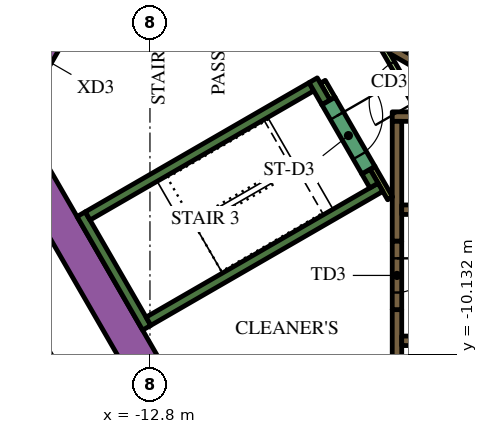
"""IFC4 building model, lengths in metres.
Left out: names, types, materials, properties, quantities, classifications, styles, units other than length and angle.
Written with IfcOpenShell. Run it as: python <this file> out.ifc"""

import sys

from ifc_helpers import new_model, si_unit, direction, frame, frame_2d, origin, place, context, subcontext, project, spatial, polyline, rectangle, outline, extrude, element, fill, save


model = new_model("IFC4")
c1 = context("Model", 3, precision=1e-05, world=origin(), true_north=direction((0.0, 1.0)))
c2 = subcontext(c1, "Body", "Model", "MODEL_VIEW")
j1 = project(units=[si_unit("LENGTHUNIT", "METRE"), si_unit("PLANEANGLEUNIT", "RADIAN")], contexts=[c1])
p1 = place(None, origin())
s1 = spatial("IfcSite", under=j1, at=p1, CompositionType="ELEMENT")
p2 = place(p1, origin())
s2 = spatial("IfcBuilding", under=s1, at=p2, CompositionType="ELEMENT")
p3 = place(p2, frame((0.0, 0.0, 27.6)))
s3 = spatial("IfcBuildingStorey", under=s2, at=p3, CompositionType="ELEMENT", Elevation=27.6)
p4 = place(p3, frame((-12.134, -11.883, 0.0), z_axis=(0.0, 0.0, 1.0), x_axis=(-0.500005339912, 0.866022320763, 0.0)))
e1 = element("IfcWall", 1, at=p4, inside=s3, PredefinedType="SOLIDWALL", context=c2, shape_type="SweptSolid", body=[
    extrude(rectangle(XDim=9.488, YDim=0.9, at=frame_2d((4.744, 0.0))), origin(), (0.0, 0.0, 1.0), 3.9),
])
p5 = place(p3, frame((-12.885, -9.431, 0.0), z_axis=(0.0, 0.0, 1.0), x_axis=(-0.500020560727, 0.866013532718, 0.0)))
e2 = element("IfcWall", 2, at=p5, inside=s3, PredefinedType="SOLIDWALL", context=c2, shape_type="SweptSolid", body=[
    extrude(rectangle(XDim=3.45, YDim=0.25, at=frame_2d((1.725, 0.0))), origin(), (0.0, 0.0, 1.0), 3.9),
])
p6 = place(p3, frame((-14.44, -6.49, 0.0), z_axis=(0.0, 0.0, 1.0), x_axis=(0.866022966069, 0.500004222222, 0.0)))
e3 = element("IfcWall", 3, at=p6, inside=s3, PredefinedType="SOLIDWALL", context=c2, shape_type="SweptSolid", body=[
    extrude(rectangle(XDim=6.8, YDim=0.25, at=frame_2d((3.4, 0.0))), origin(), (0.0, 0.0, 1.0), 3.9),
])
p7 = place(p3, frame((-8.168, -3.503, 0.0), z_axis=(0.0, 0.0, 1.0), x_axis=(-0.499952099219, 0.866053057547, 0.0)))
e4 = element("IfcWall", 4, at=p7, inside=s3, PredefinedType="SOLIDWALL", context=c2, shape_type="SweptSolid", body=[
    extrude(rectangle(XDim=0.675, YDim=0.25, at=frame_2d((0.337, 0.0))), origin(), (0.0, 0.0, 1.0), 3.9),
])
p8 = place(p3, frame((-12.84, -9.261, 0.0), z_axis=(0.0, 0.0, 1.0), x_axis=(0.866016039709, 0.500016218704, 0.0)))
e5 = element("IfcWall", 5, at=p8, inside=s3, PredefinedType="SOLIDWALL", context=c2, shape_type="SweptSolid", body=[
    extrude(rectangle(XDim=7.05, YDim=0.25, at=frame_2d((3.525, 0.0))), origin(), (0.0, 0.0, 1.0), 3.9),
])
p9 = place(p3, frame((-6.905, -5.69, 0.0), z_axis=(0.0, 0.0, 1.0), x_axis=(-0.500402024738, 0.865793170242, 0.0)))
e6 = element("IfcWall", 6, at=p9, inside=s3, PredefinedType="SOLIDWALL", context=c2, shape_type="SweptSolid", body=[
    extrude(rectangle(XDim=0.425, YDim=0.25, at=frame_2d((0.212, 0.0))), origin(), (0.0, 0.0, 1.0), 3.9),
])
p10 = place(p3, frame((-6.3, -12.1, 0.0), z_axis=(0.0, 0.0, 1.0), x_axis=(0.0, 1.0, 0.0)))
e7 = element("IfcWall", 7, at=p10, inside=s3, PredefinedType="SOLIDWALL", context=c2, shape_type="SweptSolid", body=[
    extrude(rectangle(XDim=3.146, YDim=0.25, at=frame_2d((1.573, 0.0))), origin(), (0.0, 0.0, 1.0), 3.9),
])
p11 = place(p3, frame((-6.425, -3.875, 0.0), z_axis=(0.0, 0.0, 1.0), x_axis=(1.0, 0.0, 0.0)))
e8 = element("IfcWall", 8, at=p11, inside=s3, PredefinedType="SOLIDWALL", context=c2, shape_type="SweptSolid", body=[
    extrude(rectangle(XDim=0.658, YDim=0.25, at=frame_2d((0.329, 0.0))), origin(), (0.0, 0.0, 1.0), 3.9),
])
p12 = place(p3, frame((-6.3, -4.0, 0.0), z_axis=(0.0, 0.0, 1.0), x_axis=(0.0, -1.0, 0.0)))
e9 = element("IfcWall", 9, at=p12, inside=s3, PredefinedType="SOLIDWALL", context=c2, shape_type="SweptSolid", body=[
    extrude(rectangle(XDim=3.154, YDim=0.25, at=frame_2d((1.577, 0.0))), origin(), (0.0, 0.0, 1.0), 3.9),
])
p13 = place(p3, origin())
e10 = element("IfcWall", 10, at=p13, inside=s3, PredefinedType="SOLIDWALL", context=c2, shape_type="SweptSolid", body=[
    extrude(outline(polyline([(-5.922, -2.257), (-5.922, -2.257), (-5.705, -2.382), (-5.83, -2.598), (-6.483, -2.221), (-6.591, -2.033), (-6.591, -2.033), (-6.7, -2.096), (-7.952, -1.373), (-7.827, -1.156), (-5.922, -2.257)])), origin(), (0.0, 0.0, 1.0), 3.9),
])
p14 = place(p3, frame((-6.48, -6.027, 0.0), z_axis=(0.0, 0.0, 1.0), x_axis=(-0.499927229454, 0.866067413802, 0.0)))
e11 = element("IfcWall", 11, at=p14, inside=s3, PredefinedType="PARTITIONING", context=c2, shape_type="SweptSolid", body=[
    extrude(rectangle(XDim=0.929, YDim=0.15, at=frame_2d((0.464, 0.0))), origin(), (0.0, 0.0, 1.0), 3.9),
])
p15 = place(p3, frame((-8.252, -2.958, 0.0), z_axis=(0.0, 0.0, 1.0), x_axis=(0.500174715838, -0.865924508047, 0.0)))
e12 = element("IfcWall", 12, at=p15, inside=s3, PredefinedType="PARTITIONING", context=c2, shape_type="SweptSolid", body=[
    extrude(rectangle(XDim=0.514, YDim=0.15, at=frame_2d((0.257, 0.0))), origin(), (0.0, 0.0, 1.0), 2.75),
])
p16 = place(p3, frame((-6.175, -9.775, 0.0), z_axis=(0.0, 0.0, 1.0), x_axis=(1.0, 0.0, 0.0)))
e13 = element("IfcWall", 13, at=p16, inside=s3, PredefinedType="SOLIDWALL", context=c2, shape_type="SweptSolid", body=[
    extrude(rectangle(XDim=12.35, YDim=0.25, at=frame_2d((6.175, 0.0))), origin(), (0.0, 0.0, 1.0), 3.9),
])
p17 = place(p16, frame((0.585, 0.0, 0.0)))
e14 = element("IfcOpeningElement", 14, at=p17, cuts=e13, PredefinedType="OPENING", context=c2, shape_type="SweptSolid", body=[
    extrude(rectangle(XDim=1.1, YDim=2.1, at=frame_2d((0.55, 1.05))), frame((0.0, 0.135, 0.0), z_axis=(0.0, -1.0, 0.0), x_axis=(1.0, 0.0, 0.0)), (0.0, 0.0, 1.0), 0.27),
])
p18 = place(p16, frame((3.105, 0.0, 0.0)))
e15 = element("IfcOpeningElement", 15, at=p18, cuts=e13, PredefinedType="OPENING", context=c2, shape_type="SweptSolid", body=[
    extrude(rectangle(XDim=1.1, YDim=2.1, at=frame_2d((0.55, 1.05))), frame((0.0, 0.135, 0.0), z_axis=(0.0, -1.0, 0.0), x_axis=(1.0, 0.0, 0.0)), (0.0, 0.0, 1.0), 0.27),
])
p19 = place(p16, frame((5.625, 0.0, 0.0)))
e16 = element("IfcOpeningElement", 16, at=p19, cuts=e13, PredefinedType="OPENING", context=c2, shape_type="SweptSolid", body=[
    extrude(rectangle(XDim=1.1, YDim=2.1, at=frame_2d((0.55, 1.05))), frame((0.0, 0.135, 0.0), z_axis=(0.0, -1.0, 0.0), x_axis=(1.0, 0.0, 0.0)), (0.0, 0.0, 1.0), 0.27),
])
p20 = place(p16, frame((8.145, 0.0, 0.0)))
e17 = element("IfcOpeningElement", 17, at=p20, cuts=e13, PredefinedType="OPENING", context=c2, shape_type="SweptSolid", body=[
    extrude(rectangle(XDim=1.1, YDim=2.1, at=frame_2d((0.55, 1.05))), frame((0.0, 0.135, 0.0), z_axis=(0.0, -1.0, 0.0), x_axis=(1.0, 0.0, 0.0)), (0.0, 0.0, 1.0), 0.27),
])
p21 = place(p16, frame((10.665, 0.0, 0.0)))
e18 = element("IfcOpeningElement", 18, at=p21, cuts=e13, PredefinedType="OPENING", context=c2, shape_type="SweptSolid", body=[
    extrude(rectangle(XDim=1.1, YDim=2.1, at=frame_2d((0.55, 1.05))), frame((0.0, 0.135, 0.0), z_axis=(0.0, -1.0, 0.0), x_axis=(1.0, 0.0, 0.0)), (0.0, 0.0, 1.0), 0.27),
])
p22 = place(p3, frame((-6.175, -6.325, 0.0), z_axis=(0.0, 0.0, 1.0), x_axis=(1.0, 0.0, 0.0)))
e19 = element("IfcWall", 19, at=p22, inside=s3, PredefinedType="SOLIDWALL", context=c2, shape_type="SweptSolid", body=[
    extrude(rectangle(XDim=12.35, YDim=0.25, at=frame_2d((6.175, 0.0))), origin(), (0.0, 0.0, 1.0), 3.9),
])
p23 = place(p22, frame((3.205, 0.0, 0.0)))
e20 = element("IfcOpeningElement", 20, at=p23, cuts=e19, PredefinedType="OPENING", context=c2, shape_type="SweptSolid", body=[
    extrude(rectangle(XDim=0.9, YDim=2.1, at=frame_2d((0.45, 1.05))), frame((0.0, 0.135, 0.0), z_axis=(0.0, -1.0, 0.0), x_axis=(1.0, 0.0, 0.0)), (0.0, 0.0, 1.0), 0.27),
])
p24 = place(p22, frame((8.145, 0.0, 0.0)))
e21 = element("IfcOpeningElement", 21, at=p24, cuts=e19, PredefinedType="OPENING", context=c2, shape_type="SweptSolid", body=[
    extrude(rectangle(XDim=1.1, YDim=2.1, at=frame_2d((0.55, 1.05))), frame((0.0, 0.135, 0.0), z_axis=(0.0, -1.0, 0.0), x_axis=(1.0, 0.0, 0.0)), (0.0, 0.0, 1.0), 0.27),
])
p25 = place(p22, frame((10.665, 0.0, 0.0)))
e22 = element("IfcOpeningElement", 22, at=p25, cuts=e19, PredefinedType="OPENING", context=c2, shape_type="SweptSolid", body=[
    extrude(rectangle(XDim=1.1, YDim=2.1, at=frame_2d((0.55, 1.05))), frame((0.0, 0.135, 0.0), z_axis=(0.0, -1.0, 0.0), x_axis=(1.0, 0.0, 0.0)), (0.0, 0.0, 1.0), 0.27),
])
p26 = place(p3, frame((-8.103, -3.466, 0.0), z_axis=(0.0, 0.0, 1.0), x_axis=(0.500078061341, -0.865980330357, 0.0)))
e23 = element("IfcWall", 23, at=p26, inside=s3, PredefinedType="SOLIDWALL", context=c2, shape_type="SweptSolid", body=[
    extrude(rectangle(XDim=2.1, YDim=0.4, at=frame_2d((1.05, 0.0))), origin(), (0.0, 0.0, 1.0), 3.9),
])
p27 = place(p26, frame((0.45, 0.0, 0.0)))
e24 = element("IfcOpeningElement", 24, at=p27, cuts=e23, PredefinedType="OPENING", context=c2, shape_type="SweptSolid", body=[
    extrude(rectangle(XDim=1.2, YDim=2.1, at=frame_2d((0.6, 1.05))), frame((0.0, 0.21, 0.0), z_axis=(0.0, -1.0, 0.0), x_axis=(1.0, 0.0, 0.0)), (0.0, 0.0, 1.0), 0.42),
])
p28 = place(p3, frame((-6.3, -7.154, 0.0), z_axis=(0.0, 0.0, 1.0), x_axis=(0.0, -1.0, 0.0)))
e25 = element("IfcWall", 25, at=p28, inside=s3, PredefinedType="SOLIDWALL", context=c2, shape_type="SweptSolid", body=[
    extrude(rectangle(XDim=1.8, YDim=0.25, at=frame_2d((0.9, 0.0))), origin(), (0.0, 0.0, 1.0), 3.9),
])
p29 = place(p28, frame((0.45, 0.0, 0.0)))
e26 = element("IfcOpeningElement", 26, at=p29, cuts=e25, PredefinedType="OPENING", context=c2, shape_type="SweptSolid", body=[
    extrude(rectangle(XDim=0.9, YDim=2.1, at=frame_2d((0.45, 1.05))), frame((0.0, 0.135, 0.0), z_axis=(0.0, -1.0, 0.0), x_axis=(1.0, 0.0, 0.0)), (0.0, 0.0, 1.0), 0.27),
])
p30 = place(p3, frame((-5.606, -3.89, 0.0), z_axis=(0.0, 0.0, 1.0), x_axis=(-0.500027713859, 0.866009402589, 0.0)))
e27 = element("IfcWall", 27, at=p30, inside=s3, PredefinedType="PARTITIONING", context=c2, shape_type="SweptSolid", body=[
    extrude(rectangle(XDim=2.1, YDim=0.15, at=frame_2d((1.05, 0.0))), origin(), (0.0, 0.0, 1.0), 2.75),
])
p31 = place(p30, frame((0.45, 0.0, 0.0)))
e28 = element("IfcOpeningElement", 28, at=p31, cuts=e27, PredefinedType="OPENING", context=c2, shape_type="SweptSolid", body=[
    extrude(rectangle(XDim=1.2, YDim=2.1, at=frame_2d((0.6, 1.05))), frame((0.0, 0.085, 0.0), z_axis=(0.0, -1.0, 0.0), x_axis=(1.0, 0.0, 0.0)), (0.0, 0.0, 1.0), 0.17),
])
p32 = place(p3, frame((-16.209, -2.976, 0.0), z_axis=(0.0, 0.0, 1.0), x_axis=(0.499954529098, 0.86605165483, 0.0)))
e29 = element("IfcWall", 29, at=p32, inside=s3, PredefinedType="SOLIDWALL", context=c2, shape_type="SweptSolid", body=[
    extrude(rectangle(XDim=1.7, YDim=0.9, at=frame_2d((0.85, 0.0))), origin(), (0.0, 0.0, 1.0), 3.9),
])
p33 = place(p32, frame((0.25, 0.0, 0.0)))
e30 = element("IfcOpeningElement", 30, at=p33, cuts=e29, PredefinedType="OPENING", context=c2, shape_type="SweptSolid", body=[
    extrude(rectangle(XDim=1.2, YDim=2.1, at=frame_2d((0.6, 1.05))), frame((0.0, 0.46, 0.0), z_axis=(0.0, -1.0, 0.0), x_axis=(1.0, 0.0, 0.0)), (0.0, 0.0, 1.0), 0.92),
])
p34 = place(p3, frame((-19.081, -3.9, 0.0), z_axis=(0.0, 0.0, 1.0), x_axis=(0.499998313975, 0.866026377209, 0.0)))
e31 = element("IfcWall", 31, at=p34, inside=s3, PredefinedType="PARTITIONING", context=c2, shape_type="SweptSolid", body=[
    extrude(rectangle(XDim=25.766, YDim=0.15, at=frame_2d((12.883, 0.0))), origin(), (0.0, 0.0, 1.0), 2.75),
])
p35 = place(p34, frame((24.586, 0.0, 0.0)))
e32 = element("IfcOpeningElement", 32, at=p35, cuts=e31, PredefinedType="OPENING", context=c2, shape_type="SweptSolid", body=[
    extrude(rectangle(XDim=1.0, YDim=2.1, at=frame_2d((0.5, 1.05))), frame((0.0, 0.085, 0.0), z_axis=(0.0, -1.0, 0.0), x_axis=(1.0, 0.0, 0.0)), (0.0, 0.0, 1.0), 0.17),
])
p36 = place(p34, frame((16.196, 0.0, 0.0)))
e33 = element("IfcOpeningElement", 33, at=p36, cuts=e31, PredefinedType="OPENING", context=c2, shape_type="SweptSolid", body=[
    extrude(rectangle(XDim=1.0, YDim=2.1, at=frame_2d((0.5, 1.05))), frame((0.0, 0.085, 0.0), z_axis=(0.0, -1.0, 0.0), x_axis=(1.0, 0.0, 0.0)), (0.0, 0.0, 1.0), 0.17),
])
p37 = place(p34, frame((14.789, 0.0, 0.0)))
e34 = element("IfcOpeningElement", 34, at=p37, cuts=e31, PredefinedType="OPENING", context=c2, shape_type="SweptSolid", body=[
    extrude(rectangle(XDim=1.1, YDim=2.1, at=frame_2d((0.55, 1.05))), frame((0.0, 0.085, 0.0), z_axis=(0.0, -1.0, 0.0), x_axis=(1.0, 0.0, 0.0)), (0.0, 0.0, 1.0), 0.17),
])
p38 = place(p34, frame((3.698, 0.0, 0.0)))
e35 = element("IfcOpeningElement", 35, at=p38, cuts=e31, PredefinedType="OPENING", context=c2, shape_type="SweptSolid", body=[
    extrude(rectangle(XDim=1.0, YDim=2.1, at=frame_2d((0.5, 1.05))), frame((0.0, 0.085, 0.0), z_axis=(0.0, -1.0, 0.0), x_axis=(1.0, 0.0, 0.0)), (0.0, 0.0, 1.0), 0.17),
])
p39 = place(p34, frame((1.531, 0.0, 0.0)))
e36 = element("IfcOpeningElement", 36, at=p39, cuts=e31, PredefinedType="OPENING", context=c2, shape_type="SweptSolid", body=[
    extrude(rectangle(XDim=0.9, YDim=2.1, at=frame_2d((0.45, 1.05))), frame((0.0, 0.085, 0.0), z_axis=(0.0, -1.0, 0.0), x_axis=(1.0, 0.0, 0.0)), (0.0, 0.0, 1.0), 0.17),
])
p40 = place(p3, frame((-12.918, -14.575, 0.0), z_axis=(0.0, 0.0, 1.0), x_axis=(-0.500009150678, 0.866020120573, 0.0)))
e37 = element("IfcWall", 37, at=p40, inside=s3, PredefinedType="PARTITIONING", context=c2, shape_type="SweptSolid", body=[
    extrude(rectangle(XDim=5.258, YDim=0.15, at=frame_2d((2.629, 0.0))), origin(), (0.0, 0.0, 1.0), 2.75),
])
p41 = place(p27, origin())
e38 = element("IfcDoor", 38, at=p41, inside=s3, OperationType="SINGLE_SWING_LEFT", PredefinedType="DOOR", context=c2, shape_type="SweptSolid", body=[
    extrude(rectangle(XDim=1.2, YDim=2.1, at=frame_2d((0.6, 1.05))), frame((0.0, 0.025, 0.0), z_axis=(0.0, -1.0, 0.0), x_axis=(1.0, 0.0, 0.0)), (0.0, 0.0, 1.0), 0.05),
])
fill(e24, e38)
p42 = place(p29, origin())
e39 = element("IfcDoor", 39, at=p42, inside=s3, OperationType="SINGLE_SWING_LEFT", PredefinedType="DOOR", context=c2, shape_type="SweptSolid", body=[
    extrude(rectangle(XDim=0.9, YDim=2.1, at=frame_2d((0.45, 1.05))), frame((0.0, 0.025, 0.0), z_axis=(0.0, -1.0, 0.0), x_axis=(1.0, 0.0, 0.0)), (0.0, 0.0, 1.0), 0.05),
])
fill(e26, e39)
p43 = place(p31, origin())
e40 = element("IfcDoor", 40, at=p43, inside=s3, OperationType="SINGLE_SWING_LEFT", PredefinedType="DOOR", context=c2, shape_type="SweptSolid", body=[
    extrude(rectangle(XDim=1.2, YDim=2.1, at=frame_2d((0.6, 1.05))), frame((0.0, 0.025, 0.0), z_axis=(0.0, -1.0, 0.0), x_axis=(1.0, 0.0, 0.0)), (0.0, 0.0, 1.0), 0.05),
])
fill(e28, e40)
save(model, sys.argv[1])
